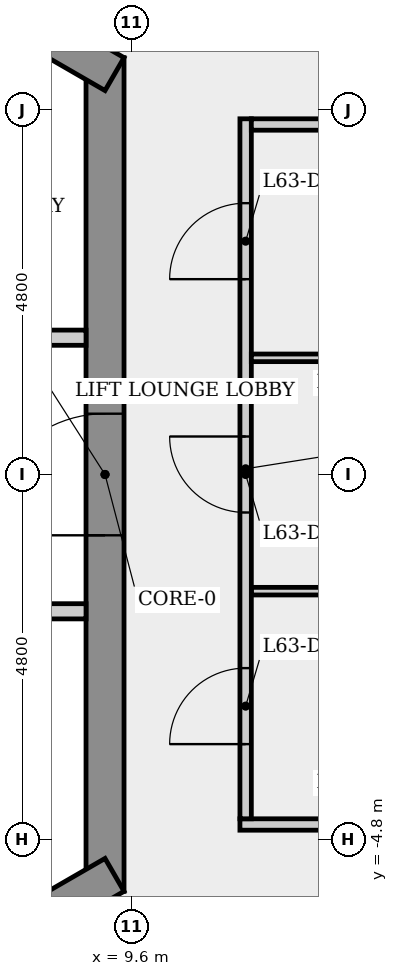
"""IFC4 building model, lengths in metres.
Left out: names, types, materials, properties, quantities, classifications, styles, units other than length and angle.
Written with IfcOpenShell. Run it as: python <this file> out.ifc"""

import sys

from ifc_helpers import new_model, si_unit, direction, frame, frame_2d, origin, place, context, subcontext, project, spatial, rectangle, extrude, element, fill, save


model = new_model("IFC4")
c1 = context("Model", 3, precision=1e-05, world=origin(), true_north=direction((0.0, 1.0)))
c2 = subcontext(c1, "Body", "Model", "MODEL_VIEW")
j1 = project(units=[si_unit("LENGTHUNIT", "METRE"), si_unit("PLANEANGLEUNIT", "RADIAN")], contexts=[c1])
p1 = place(None, origin())
s1 = spatial("IfcSite", under=j1, at=p1, CompositionType="ELEMENT")
p2 = place(p1, origin())
s2 = spatial("IfcBuilding", under=s1, at=p2, CompositionType="ELEMENT")
p3 = place(p2, frame((0.0, 0.0, 235.9)))
s3 = spatial("IfcBuildingStorey", under=s2, at=p3, CompositionType="ELEMENT", Elevation=235.9)
p4 = place(p3, frame((9.25, -5.485, 0.0), z_axis=(0.0, 0.0, 1.0), x_axis=(0.0, 1.0, 0.0)))
e1 = element("IfcWall", 1, at=p4, inside=s3, PredefinedType="SHEAR", context=c2, shape_type="SweptSolid", body=[
    extrude(rectangle(XDim=10.97, YDim=0.5, at=frame_2d((5.485, 0.0))), origin(), (0.0, 0.0, 1.0), 3.4),
])
p5 = place(p4, frame((4.685, 0.0, 0.0)))
e2 = element("IfcOpeningElement", 2, at=p5, cuts=e1, PredefinedType="OPENING", context=c2, shape_type="SweptSolid", body=[
    extrude(rectangle(XDim=1.6, YDim=2.1, at=frame_2d((0.8, 1.05))), frame((0.0, 0.26, 0.0), z_axis=(0.0, -1.0, 0.0), x_axis=(1.0, 0.0, 0.0)), (0.0, 0.0, 1.0), 0.52),
])
p6 = place(p3, frame((9.375, 5.268, 0.0), z_axis=(0.0, 0.0, 1.0), x_axis=(-0.866023993627, 0.500002442456, 0.0)))
e3 = element("IfcWall", 3, at=p6, inside=s3, PredefinedType="SHEAR", context=c2, shape_type="SweptSolid", body=[
    extrude(rectangle(XDim=10.97, YDim=0.5, at=frame_2d((5.485, 0.0))), origin(), (0.0, 0.0, 1.0), 3.4),
])
p7 = place(p6, frame((8.383, 0.0, 0.0)))
e4 = element("IfcOpeningElement", 4, at=p7, cuts=e3, PredefinedType="OPENING", context=c2, shape_type="SweptSolid", body=[
    extrude(rectangle(XDim=0.9, YDim=2.1, at=frame_2d((0.45, 1.05))), frame((0.0, 0.26, 0.0), z_axis=(0.0, -1.0, 0.0), x_axis=(1.0, 0.0, 0.0)), (0.0, 0.0, 1.0), 0.52),
])
p8 = place(p6, frame((3.165, 0.0, 0.0)))
e5 = element("IfcOpeningElement", 5, at=p8, cuts=e3, PredefinedType="OPENING", context=c2, shape_type="SweptSolid", body=[
    extrude(rectangle(XDim=0.9, YDim=2.1, at=frame_2d((0.45, 1.05))), frame((0.0, 0.26, 0.0), z_axis=(0.0, -1.0, 0.0), x_axis=(1.0, 0.0, 0.0)), (0.0, 0.0, 1.0), 0.52),
])
p9 = place(p3, frame((-0.125, -10.753, 0.0), z_axis=(0.0, 0.0, 1.0), x_axis=(0.866023993627, 0.500002442456, 0.0)))
e6 = element("IfcWall", 6, at=p9, inside=s3, PredefinedType="SHEAR", context=c2, shape_type="SweptSolid", body=[
    extrude(rectangle(XDim=10.97, YDim=0.5, at=frame_2d((5.485, 0.0))), origin(), (0.0, 0.0, 1.0), 3.4),
])
p10 = place(p9, frame((0.9, 0.0, 0.0)))
e7 = element("IfcOpeningElement", 7, at=p10, cuts=e6, PredefinedType="OPENING", context=c2, shape_type="SweptSolid", body=[
    extrude(rectangle(XDim=0.9, YDim=2.1, at=frame_2d((0.45, 1.05))), frame((0.0, 0.26, 0.0), z_axis=(0.0, -1.0, 0.0), x_axis=(1.0, 0.0, 0.0)), (0.0, 0.0, 1.0), 0.52),
])
p11 = place(p9, frame((7.542, 0.0, 0.0)))
e8 = element("IfcOpeningElement", 8, at=p11, cuts=e6, PredefinedType="OPENING", context=c2, shape_type="SweptSolid", body=[
    extrude(rectangle(XDim=0.9, YDim=2.1, at=frame_2d((0.45, 1.05))), frame((0.0, 0.26, 0.0), z_axis=(0.0, -1.0, 0.0), x_axis=(1.0, 0.0, 0.0)), (0.0, 0.0, 1.0), 0.52),
])
for number, where, z_axis, x_axis in (
    (9, (7.475, 1.8, 0.0), (0.0, 0.0, 1.0), (1.0, 0.0, 0.0)),
    (10, (9.0, -1.8, 0.0), (0.0, 0.0, 1.0), (-1.0, 0.0, 0.0)),
):
    element("IfcWall", number, at=place(p3, frame(where, z_axis=z_axis, x_axis=x_axis)), inside=s3, PredefinedType="PARTITIONING", context=c2, shape_type="SweptSolid", body=[
        extrude(rectangle(XDim=1.525, YDim=0.2, at=frame_2d((0.763, 0.0))), origin(), (0.0, 0.0, 1.0), 3.05),
    ])
p12 = place(p3, frame((11.025, -4.605, 0.0), z_axis=(0.0, 0.0, 1.0), x_axis=(1.0, 0.0, 0.0)))
e11 = element("IfcWall", 11, at=p12, inside=s3, PredefinedType="PARTITIONING", context=c2, shape_type="SweptSolid", body=[
    extrude(rectangle(XDim=3.324, YDim=0.15, at=frame_2d((1.662, 0.0))), origin(), (0.0, 0.0, 1.0), 3.05),
])
p13 = place(p3, frame((11.175, -1.535, 0.0), z_axis=(0.0, 0.0, 1.0), x_axis=(1.0, 0.0, 0.0)))
e12 = element("IfcWall", 12, at=p13, inside=s3, PredefinedType="PARTITIONING", context=c2, shape_type="SweptSolid", body=[
    extrude(rectangle(XDim=5.712, YDim=0.1, at=frame_2d((2.856, 0.0))), origin(), (0.0, 0.0, 1.0), 3.05),
])
p14 = place(p3, frame((11.1, -4.53, 0.0), z_axis=(0.0, 0.0, 1.0), x_axis=(0.0, 1.0, 0.0)))
e13 = element("IfcWall", 13, at=p14, inside=s3, PredefinedType="PARTITIONING", context=c2, shape_type="SweptSolid", body=[
    extrude(rectangle(XDim=9.21, YDim=0.15, at=frame_2d((4.605, 0.0))), origin(), (0.0, 0.0, 1.0), 3.05),
])
p15 = place(p14, frame((0.983, 0.0, 0.0)))
e14 = element("IfcOpeningElement", 14, at=p15, cuts=e13, PredefinedType="OPENING", context=c2, shape_type="SweptSolid", body=[
    extrude(rectangle(XDim=1.0, YDim=2.1, at=frame_2d((0.5, 1.05))), frame((0.0, 0.085, 0.0), z_axis=(0.0, -1.0, 0.0), x_axis=(1.0, 0.0, 0.0)), (0.0, 0.0, 1.0), 0.17),
])
p16 = place(p14, frame((4.03, 0.0, 0.0)))
e15 = element("IfcOpeningElement", 15, at=p16, cuts=e13, PredefinedType="OPENING", context=c2, shape_type="SweptSolid", body=[
    extrude(rectangle(XDim=1.0, YDim=2.1, at=frame_2d((0.5, 1.05))), frame((0.0, 0.085, 0.0), z_axis=(0.0, -1.0, 0.0), x_axis=(1.0, 0.0, 0.0)), (0.0, 0.0, 1.0), 0.17),
])
p17 = place(p14, frame((7.1, 0.0, 0.0)))
e16 = element("IfcOpeningElement", 16, at=p17, cuts=e13, PredefinedType="OPENING", context=c2, shape_type="SweptSolid", body=[
    extrude(rectangle(XDim=1.0, YDim=2.1, at=frame_2d((0.5, 1.05))), frame((0.0, 0.085, 0.0), z_axis=(0.0, -1.0, 0.0), x_axis=(1.0, 0.0, 0.0)), (0.0, 0.0, 1.0), 0.17),
])
p18 = place(p3, frame((11.175, 1.535, 0.0), z_axis=(0.0, 0.0, 1.0), x_axis=(1.0, 0.0, 0.0)))
e17 = element("IfcWall", 17, at=p18, inside=s3, PredefinedType="PARTITIONING", context=c2, shape_type="SweptSolid", body=[
    extrude(rectangle(XDim=5.712, YDim=0.1, at=frame_2d((2.856, 0.0))), origin(), (0.0, 0.0, 1.0), 3.05),
])
p19 = place(p3, frame((14.199, 4.605, 0.0), z_axis=(0.0, 0.0, 1.0), x_axis=(-1.0, 0.0, 0.0)))
e18 = element("IfcWall", 18, at=p19, inside=s3, PredefinedType="PARTITIONING", context=c2, shape_type="SweptSolid", body=[
    extrude(rectangle(XDim=3.025, YDim=0.15, at=frame_2d((1.512, 0.0))), origin(), (0.0, 0.0, 1.0), 3.05),
])
p20 = place(p3, frame((14.237, -4.67, 0.0), z_axis=(0.0, 0.0, 1.0), x_axis=(-0.500003557676, -0.866023349749, 0.0)))
e19 = element("IfcWall", 19, at=p20, inside=s3, PredefinedType="PARTITIONING", context=c2, shape_type="SweptSolid", body=[
    extrude(rectangle(XDim=6.591, YDim=0.15, at=frame_2d((3.295, 0.0))), origin(), (0.0, 0.0, 1.0), 3.05),
])
p21 = place(p20, frame((2.795, 0.0, 0.0)))
e20 = element("IfcOpeningElement", 20, at=p21, cuts=e19, PredefinedType="OPENING", context=c2, shape_type="SweptSolid", body=[
    extrude(rectangle(XDim=1.0, YDim=2.1, at=frame_2d((0.5, 1.05))), frame((0.0, 0.085, 0.0), z_axis=(0.0, -1.0, 0.0), x_axis=(1.0, 0.0, 0.0)), (0.0, 0.0, 1.0), 0.17),
])
p22 = place(p15, origin())
e21 = element("IfcDoor", 21, at=p22, inside=s3, OperationType="SINGLE_SWING_LEFT", PredefinedType="DOOR", context=c2, shape_type="SweptSolid", body=[
    extrude(rectangle(XDim=1.0, YDim=2.1, at=frame_2d((0.5, 1.05))), frame((0.0, 0.025, 0.0), z_axis=(0.0, -1.0, 0.0), x_axis=(1.0, 0.0, 0.0)), (0.0, 0.0, 1.0), 0.05),
])
fill(e14, e21)
p23 = place(p16, origin())
e22 = element("IfcDoor", 22, at=p23, inside=s3, OperationType="SINGLE_SWING_RIGHT", PredefinedType="DOOR", context=c2, shape_type="SweptSolid", body=[
    extrude(rectangle(XDim=1.0, YDim=2.1, at=frame_2d((0.5, 1.05))), frame((0.0, 0.025, 0.0), z_axis=(0.0, -1.0, 0.0), x_axis=(1.0, 0.0, 0.0)), (0.0, 0.0, 1.0), 0.05),
])
fill(e15, e22)
p24 = place(p17, origin())
e23 = element("IfcDoor", 23, at=p24, inside=s3, OperationType="SINGLE_SWING_LEFT", PredefinedType="DOOR", context=c2, shape_type="SweptSolid", body=[
    extrude(rectangle(XDim=1.0, YDim=2.1, at=frame_2d((0.5, 1.05))), frame((0.0, 0.025, 0.0), z_axis=(0.0, -1.0, 0.0), x_axis=(1.0, 0.0, 0.0)), (0.0, 0.0, 1.0), 0.05),
])
fill(e16, e23)
p25 = place(p5, origin())
e24 = element("IfcDoor", 24, at=p25, inside=s3, OperationType="SINGLE_SWING_LEFT", PredefinedType="DOOR", context=c2, shape_type="SweptSolid", body=[
    extrude(rectangle(XDim=1.6, YDim=2.1, at=frame_2d((0.8, 1.05))), frame((0.0, 0.025, 0.0), z_axis=(0.0, -1.0, 0.0), x_axis=(1.0, 0.0, 0.0)), (0.0, 0.0, 1.0), 0.05),
])
fill(e2, e24)
save(model, sys.argv[1])
